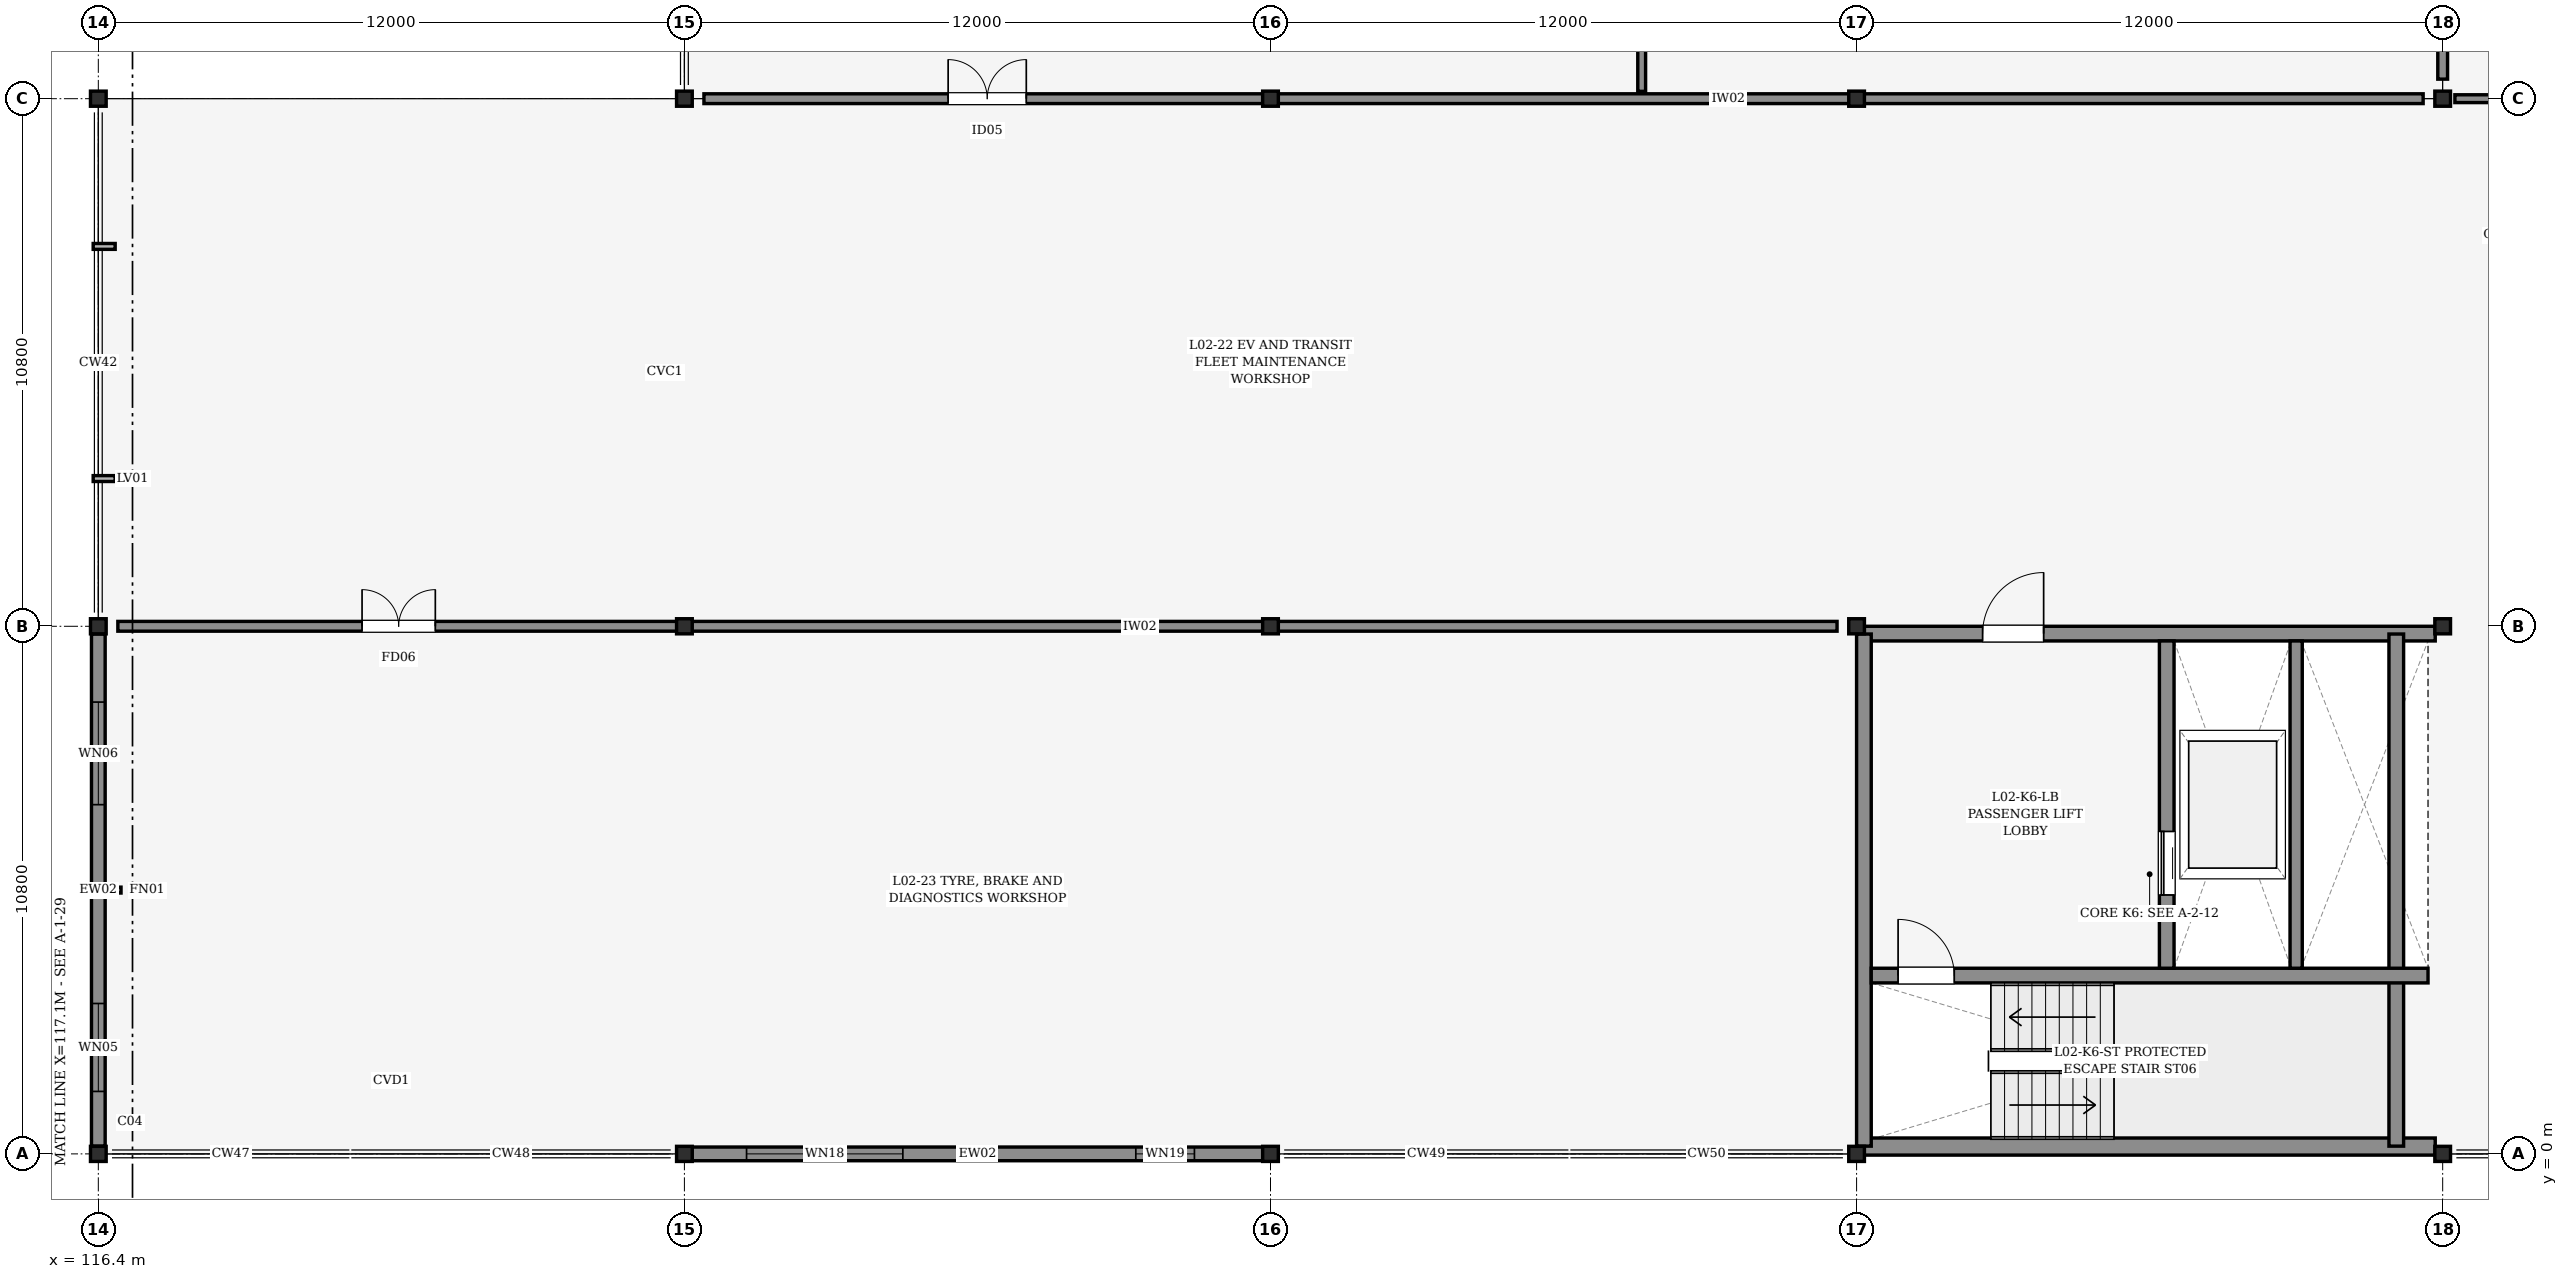
"""IFC4 building model, lengths in metres.
Left out: names, types, materials, properties, quantities, classifications, styles, units other than length and angle.
Written with IfcOpenShell. Run it as: python <this file> out.ifc"""

import sys

from ifc_helpers import new_model, si_unit, direction, frame, frame_2d, origin, origin_2d, place, context, subcontext, project, spatial, rectangle, i_section, extrude, element, fill, save


model = new_model("IFC4")
c1 = context("Model", 3, precision=1e-05, world=origin(), true_north=direction((0.0, 1.0)))
c2 = subcontext(c1, "Body", "Model", "MODEL_VIEW")
j1 = project(units=[si_unit("LENGTHUNIT", "METRE"), si_unit("PLANEANGLEUNIT", "RADIAN")], contexts=[c1])
p1 = place(None, origin())
s1 = spatial("IfcSite", under=j1, at=p1, CompositionType="ELEMENT")
p2 = place(p1, origin())
s2 = spatial("IfcBuilding", under=s1, at=p2, CompositionType="ELEMENT")
p3 = place(p2, frame((0.0, 0.0, 9.0)))
s3 = spatial("IfcBuildingStorey", under=s2, at=p3, CompositionType="ELEMENT", Elevation=9.0)
for number, where, z_axis, x_axis in (
    (1, (116.4, 0.0, 0.0), (0.0, 0.0, 1.0), (1.0, 0.0, 0.0)),
    (2, (116.4, 10.8, 0.0), (0.0, 0.0, 1.0), (1.0, 0.0, 0.0)),
    (3, (116.4, 21.6, 0.0), (0.0, 0.0, 1.0), (1.0, 0.0, 0.0)),
    (4, (128.4, 0.0, 0.0), (0.0, 0.0, 1.0), (1.0, 0.0, 0.0)),
    (5, (128.4, 10.8, 0.0), (0.0, 0.0, 1.0), (1.0, 0.0, 0.0)),
    (6, (128.4, 21.6, 0.0), (0.0, 0.0, 1.0), (1.0, 0.0, 0.0)),
    (7, (140.4, 0.0, 0.0), (0.0, 0.0, 1.0), (1.0, 0.0, 0.0)),
    (8, (140.4, 10.8, 0.0), (0.0, 0.0, 1.0), (1.0, 0.0, 0.0)),
    (9, (140.4, 21.6, 0.0), (0.0, 0.0, 1.0), (1.0, 0.0, 0.0)),
    (10, (152.4, 0.0, 0.0), (0.0, 0.0, 1.0), (1.0, 0.0, 0.0)),
    (11, (152.4, 10.8, 0.0), (0.0, 0.0, 1.0), (1.0, 0.0, 0.0)),
    (12, (152.4, 21.6, 0.0), (0.0, 0.0, 1.0), (1.0, 0.0, 0.0)),
    (13, (164.4, 0.0, 0.0), (0.0, 0.0, 1.0), (1.0, 0.0, 0.0)),
    (14, (164.4, 10.8, 0.0), (0.0, 0.0, 1.0), (1.0, 0.0, 0.0)),
    (15, (164.4, 21.6, 0.0), (0.0, 0.0, 1.0), (1.0, 0.0, 0.0)),
):
    element("IfcColumn", number, at=place(p3, frame(where, z_axis=z_axis, x_axis=x_axis)), inside=s3, PredefinedType="COLUMN", context=c2, shape_type="SweptSolid", body=[
        extrude(i_section(OverallWidth=0.309, OverallDepth=0.321, WebThickness=0.014, FlangeThickness=0.022, FilletRadius=0.015, at=origin_2d()), origin(), (0.0, 0.0, 1.0), 3.6),
    ])
p4 = place(p3, frame((128.552, 0.0, 0.0), z_axis=(0.0, 0.0, 1.0), x_axis=(1.0, 0.0, 0.0)))
e16 = element("IfcWall", 16, at=p4, inside=s3, PredefinedType="STANDARD", context=c2, shape_type="SweptSolid", body=[
    extrude(rectangle(XDim=11.695, YDim=0.28, at=frame_2d((5.848, 0.0))), origin(), (0.0, 0.0, 1.0), 2.535),
])
p5 = place(p4, frame((1.12, 0.0, 0.595)))
e17 = element("IfcOpeningElement", 17, at=p5, cuts=e16, PredefinedType="OPENING", context=c2, shape_type="SweptSolid", body=[
    extrude(rectangle(XDim=3.2, YDim=1.8, at=frame_2d((1.6, 0.9))), frame((0.0, 0.15, 0.0), z_axis=(0.0, -1.0, 0.0), x_axis=(1.0, 0.0, 0.0)), (0.0, 0.0, 1.0), 0.3),
])
p6 = place(p4, frame((9.09, 0.0, 0.595)))
e18 = element("IfcOpeningElement", 18, at=p6, cuts=e16, PredefinedType="OPENING", context=c2, shape_type="SweptSolid", body=[
    extrude(rectangle(XDim=1.2, YDim=1.8, at=frame_2d((0.6, 0.9))), frame((0.0, 0.15, 0.0), z_axis=(0.0, -1.0, 0.0), x_axis=(1.0, 0.0, 0.0)), (0.0, 0.0, 1.0), 0.3),
])
p7 = place(p3, frame((116.4, 0.158, 0.0), z_axis=(0.0, 0.0, 1.0), x_axis=(0.0, 1.0, 0.0)))
e19 = element("IfcWall", 19, at=p7, inside=s3, PredefinedType="STANDARD", context=c2, shape_type="SweptSolid", body=[
    extrude(rectangle(XDim=10.483, YDim=0.28, at=frame_2d((5.242, 0.0))), origin(), (0.0, 0.0, 1.0), 2.535),
])
p8 = place(p7, frame((1.12, 0.0, 0.595)))
e20 = element("IfcOpeningElement", 20, at=p8, cuts=e19, PredefinedType="OPENING", context=c2, shape_type="SweptSolid", body=[
    extrude(rectangle(XDim=1.8, YDim=1.8, at=frame_2d((0.9, 0.9))), frame((0.0, 0.15, 0.0), z_axis=(0.0, -1.0, 0.0), x_axis=(1.0, 0.0, 0.0)), (0.0, 0.0, 1.0), 0.3),
])
p9 = place(p7, frame((6.99, 0.0, 0.595)))
e21 = element("IfcOpeningElement", 21, at=p9, cuts=e19, PredefinedType="OPENING", context=c2, shape_type="SweptSolid", body=[
    extrude(rectangle(XDim=2.1, YDim=1.8, at=frame_2d((1.05, 0.9))), frame((0.0, 0.15, 0.0), z_axis=(0.0, -1.0, 0.0), x_axis=(1.0, 0.0, 0.0)), (0.0, 0.0, 1.0), 0.3),
])
p10 = place(p3, frame((152.552, 0.15, 0.0), z_axis=(0.0, 0.0, 1.0), x_axis=(1.0, 0.0, 0.0)))
e22 = element("IfcWall", 22, at=p10, inside=s3, PredefinedType="SHEAR", context=c2, shape_type="SweptSolid", body=[
    extrude(rectangle(XDim=11.695, YDim=0.35, at=frame_2d((5.848, 0.0))), origin(), (0.0, 0.0, 1.0), 3.38),
])
p11 = place(p3, frame((152.552, 10.65, 0.0), z_axis=(0.0, 0.0, 1.0), x_axis=(1.0, 0.0, 0.0)))
e23 = element("IfcWall", 23, at=p11, inside=s3, PredefinedType="SHEAR", context=c2, shape_type="SweptSolid", body=[
    extrude(rectangle(XDim=11.695, YDim=0.3, at=frame_2d((5.848, 0.0))), origin(), (0.0, 0.0, 1.0), 3.38),
])
p12 = place(p11, frame((2.427, 0.0, 0.0)))
e24 = element("IfcOpeningElement", 24, at=p12, cuts=e23, PredefinedType="OPENING", context=c2, shape_type="SweptSolid", body=[
    extrude(rectangle(XDim=1.25, YDim=2.15, at=frame_2d((0.625, 1.075))), frame((0.0, 0.16, 0.0), z_axis=(0.0, -1.0, 0.0), x_axis=(1.0, 0.0, 0.0)), (0.0, 0.0, 1.0), 0.32),
])
for number, where, z_axis, x_axis in (
    (25, (152.55, 0.158, 0.0), (0.0, 0.0, 1.0), (0.0, 1.0, 0.0)),
    (26, (163.45, 0.158, 0.0), (0.0, 0.0, 1.0), (0.0, 1.0, 0.0)),
):
    element("IfcWall", number, at=place(p3, frame(where, z_axis=z_axis, x_axis=x_axis)), inside=s3, PredefinedType="SHEAR", context=c2, shape_type="SweptSolid", body=[
        extrude(rectangle(XDim=10.483, YDim=0.3, at=frame_2d((5.242, 0.0))), origin(), (0.0, 0.0, 1.0), 3.38),
    ])
p13 = place(p3, frame((152.7, 3.65, 0.0), z_axis=(0.0, 0.0, 1.0), x_axis=(1.0, 0.0, 0.0)))
e27 = element("IfcWall", 27, at=p13, inside=s3, PredefinedType="SHEAR", context=c2, shape_type="SweptSolid", body=[
    extrude(rectangle(XDim=11.4, YDim=0.3, at=frame_2d((5.7, 0.0))), origin(), (0.0, 0.0, 1.0), 3.38),
])
p14 = place(p13, frame((0.55, 0.0, 0.0)))
e28 = element("IfcOpeningElement", 28, at=p14, cuts=e27, PredefinedType="OPENING", context=c2, shape_type="SweptSolid", body=[
    extrude(rectangle(XDim=1.15, YDim=2.15, at=frame_2d((0.575, 1.075))), frame((0.0, 0.16, 0.0), z_axis=(0.0, -1.0, 0.0), x_axis=(1.0, 0.0, 0.0)), (0.0, 0.0, 1.0), 0.32),
])
p15 = place(p3, frame((158.75, 3.8, 0.0), z_axis=(0.0, 0.0, 1.0), x_axis=(0.0, 1.0, 0.0)))
e29 = element("IfcWall", 29, at=p15, inside=s3, PredefinedType="SHEAR", context=c2, shape_type="SweptSolid", body=[
    extrude(rectangle(XDim=6.7, YDim=0.3, at=frame_2d((3.35, 0.0))), origin(), (0.0, 0.0, 1.0), 3.38),
])
p16 = place(p15, frame((1.5, 0.0, 0.0)))
e30 = element("IfcOpeningElement", 30, at=p16, cuts=e29, PredefinedType="OPENING", context=c2, shape_type="SweptSolid", body=[
    extrude(rectangle(XDim=1.3, YDim=2.3, at=frame_2d((0.65, 1.15))), frame((0.0, 0.16, 0.0), z_axis=(0.0, -1.0, 0.0), x_axis=(1.0, 0.0, 0.0)), (0.0, 0.0, 1.0), 0.32),
])
p17 = place(p3, frame((161.4, 3.8, 0.0), z_axis=(0.0, 0.0, 1.0), x_axis=(0.0, 1.0, 0.0)))
e31 = element("IfcWall", 31, at=p17, inside=s3, PredefinedType="PARTITIONING", context=c2, shape_type="SweptSolid", body=[
    extrude(rectangle(XDim=6.7, YDim=0.25, at=frame_2d((3.35, 0.0))), origin(), (0.0, 0.0, 1.0), 2.525),
])
p18 = place(p3, frame((164.65, 21.6, 0.0), z_axis=(0.0, 0.0, 1.0), x_axis=(1.0, 0.0, 0.0)))
e32 = element("IfcWall", 32, at=p18, inside=s3, PredefinedType="PARTITIONING", context=c2, shape_type="SweptSolid", body=[
    extrude(rectangle(XDim=11.5, YDim=0.16, at=frame_2d((5.75, 0.0))), origin(), (0.0, 0.0, 1.0), 2.525),
])
p19 = place(p3, frame((116.8, 10.8, 0.0), z_axis=(0.0, 0.0, 1.0), x_axis=(1.0, 0.0, 0.0)))
e33 = element("IfcWall", 33, at=p19, inside=s3, PredefinedType="PARTITIONING", context=c2, shape_type="SweptSolid", body=[
    extrude(rectangle(XDim=35.2, YDim=0.2, at=frame_2d((17.6, 0.0))), origin(), (0.0, 0.0, 1.0), 2.525),
])
p20 = place(p19, frame((5.0, 0.0, 0.0)))
e34 = element("IfcOpeningElement", 34, at=p20, cuts=e33, PredefinedType="OPENING", context=c2, shape_type="SweptSolid", body=[
    extrude(rectangle(XDim=1.5, YDim=2.25, at=frame_2d((0.75, 1.125))), frame((0.0, 0.11, 0.0), z_axis=(0.0, -1.0, 0.0), x_axis=(1.0, 0.0, 0.0)), (0.0, 0.0, 1.0), 0.22),
])
p21 = place(p3, frame((128.8, 21.6, 0.0), z_axis=(0.0, 0.0, 1.0), x_axis=(1.0, 0.0, 0.0)))
e35 = element("IfcWall", 35, at=p21, inside=s3, PredefinedType="PARTITIONING", context=c2, shape_type="SweptSolid", body=[
    extrude(rectangle(XDim=35.2, YDim=0.2, at=frame_2d((17.6, 0.0))), origin(), (0.0, 0.0, 1.0), 2.525),
])
p22 = place(p21, frame((5.0, 0.0, 0.0)))
e36 = element("IfcOpeningElement", 36, at=p22, cuts=e35, PredefinedType="OPENING", context=c2, shape_type="SweptSolid", body=[
    extrude(rectangle(XDim=1.6, YDim=2.25, at=frame_2d((0.8, 1.125))), frame((0.0, 0.11, 0.0), z_axis=(0.0, -1.0, 0.0), x_axis=(1.0, 0.0, 0.0)), (0.0, 0.0, 1.0), 0.22),
])
p23 = place(p3, frame((148.0, 21.75, 0.0), z_axis=(0.0, 0.0, 1.0), x_axis=(0.0, 1.0, 0.0)))
e37 = element("IfcWall", 37, at=p23, inside=s3, PredefinedType="PARTITIONING", context=c2, shape_type="SweptSolid", body=[
    extrude(rectangle(XDim=24.9, YDim=0.16, at=frame_2d((12.45, 0.0))), origin(), (0.0, 0.0, 1.0), 2.525),
])
p24 = place(p23, frame((6.0, 0.0, 0.0)))
e38 = element("IfcOpeningElement", 38, at=p24, cuts=e37, PredefinedType="OPENING", context=c2, shape_type="SweptSolid", body=[
    extrude(rectangle(XDim=0.95, YDim=2.1, at=frame_2d((0.475, 1.05))), frame((0.0, 0.09, 0.0), z_axis=(0.0, -1.0, 0.0), x_axis=(1.0, 0.0, 0.0)), (0.0, 0.0, 1.0), 0.18),
])
p25 = place(p3, frame((164.4, 22.0, 0.0), z_axis=(0.0, 0.0, 1.0), x_axis=(0.0, 1.0, 0.0)))
e39 = element("IfcWall", 39, at=p25, inside=s3, PredefinedType="PARTITIONING", context=c2, shape_type="SweptSolid", body=[
    extrude(rectangle(XDim=24.4, YDim=0.2, at=frame_2d((12.2, 0.0))), origin(), (0.0, 0.0, 1.0), 2.525),
])
p26 = place(p25, frame((6.0, 0.0, 0.0)))
e40 = element("IfcOpeningElement", 40, at=p26, cuts=e39, PredefinedType="OPENING", context=c2, shape_type="SweptSolid", body=[
    extrude(rectangle(XDim=1.6, YDim=2.25, at=frame_2d((0.8, 1.125))), frame((0.0, 0.11, 0.0), z_axis=(0.0, -1.0, 0.0), x_axis=(1.0, 0.0, 0.0)), (0.0, 0.0, 1.0), 0.22),
])
p27 = place(p5, origin())
e41 = element("IfcWindow", 41, at=p27, inside=s3, PartitioningType="SINGLE_PANEL", PredefinedType="WINDOW", context=c2, shape_type="SweptSolid", body=[
    extrude(rectangle(XDim=3.2, YDim=1.8, at=frame_2d((1.6, 0.9))), frame((0.0, 0.03, 0.0), z_axis=(0.0, -1.0, 0.0), x_axis=(1.0, 0.0, 0.0)), (0.0, 0.0, 1.0), 0.06),
])
fill(e17, e41)
p28 = place(p6, origin())
e42 = element("IfcWindow", 42, at=p28, inside=s3, PartitioningType="SINGLE_PANEL", PredefinedType="WINDOW", context=c2, shape_type="SweptSolid", body=[
    extrude(rectangle(XDim=1.2, YDim=1.8, at=frame_2d((0.6, 0.9))), frame((0.0, 0.03, 0.0), z_axis=(0.0, -1.0, 0.0), x_axis=(1.0, 0.0, 0.0)), (0.0, 0.0, 1.0), 0.06),
])
fill(e18, e42)
p29 = place(p8, origin())
e43 = element("IfcWindow", 43, at=p29, inside=s3, PartitioningType="SINGLE_PANEL", PredefinedType="WINDOW", context=c2, shape_type="SweptSolid", body=[
    extrude(rectangle(XDim=1.8, YDim=1.8, at=frame_2d((0.9, 0.9))), frame((0.0, 0.03, 0.0), z_axis=(0.0, -1.0, 0.0), x_axis=(1.0, 0.0, 0.0)), (0.0, 0.0, 1.0), 0.06),
])
fill(e20, e43)
p30 = place(p9, origin())
e44 = element("IfcWindow", 44, at=p30, inside=s3, PartitioningType="SINGLE_PANEL", PredefinedType="WINDOW", context=c2, shape_type="SweptSolid", body=[
    extrude(rectangle(XDim=2.1, YDim=1.8, at=frame_2d((1.05, 0.9))), frame((0.0, 0.03, 0.0), z_axis=(0.0, -1.0, 0.0), x_axis=(1.0, 0.0, 0.0)), (0.0, 0.0, 1.0), 0.06),
])
fill(e21, e44)
p31 = place(p12, origin())
e45 = element("IfcDoor", 45, at=p31, inside=s3, OperationType="SINGLE_SWING_RIGHT", PredefinedType="DOOR", context=c2, shape_type="SweptSolid", body=[
    extrude(rectangle(XDim=1.25, YDim=2.15, at=frame_2d((0.625, 1.075))), frame((0.0, 0.025, 0.0), z_axis=(0.0, -1.0, 0.0), x_axis=(1.0, 0.0, 0.0)), (0.0, 0.0, 1.0), 0.05),
])
fill(e24, e45)
p32 = place(p14, origin())
e46 = element("IfcDoor", 46, at=p32, inside=s3, OperationType="SINGLE_SWING_LEFT", PredefinedType="DOOR", context=c2, shape_type="SweptSolid", body=[
    extrude(rectangle(XDim=1.15, YDim=2.15, at=frame_2d((0.575, 1.075))), frame((0.0, 0.025, 0.0), z_axis=(0.0, -1.0, 0.0), x_axis=(1.0, 0.0, 0.0)), (0.0, 0.0, 1.0), 0.05),
])
fill(e28, e46)
p33 = place(p16, origin())
e47 = element("IfcDoor", 47, at=p33, inside=s3, OperationType="SLIDING_TO_LEFT", PredefinedType="DOOR", context=c2, shape_type="SweptSolid", body=[
    extrude(rectangle(XDim=1.3, YDim=2.3, at=frame_2d((0.65, 1.15))), frame((0.0, 0.025, 0.0), z_axis=(0.0, -1.0, 0.0), x_axis=(1.0, 0.0, 0.0)), (0.0, 0.0, 1.0), 0.05),
])
fill(e30, e47)
p34 = place(p20, origin())
e48 = element("IfcDoor", 48, at=p34, inside=s3, OperationType="DOUBLE_DOOR_SINGLE_SWING", PredefinedType="DOOR", context=c2, shape_type="SweptSolid", body=[
    extrude(rectangle(XDim=1.5, YDim=2.25, at=frame_2d((0.75, 1.125))), frame((0.0, 0.025, 0.0), z_axis=(0.0, -1.0, 0.0), x_axis=(1.0, 0.0, 0.0)), (0.0, 0.0, 1.0), 0.05),
])
fill(e34, e48)
p35 = place(p22, origin())
e49 = element("IfcDoor", 49, at=p35, inside=s3, OperationType="DOUBLE_DOOR_SINGLE_SWING", PredefinedType="DOOR", context=c2, shape_type="SweptSolid", body=[
    extrude(rectangle(XDim=1.6, YDim=2.25, at=frame_2d((0.8, 1.125))), frame((0.0, 0.025, 0.0), z_axis=(0.0, -1.0, 0.0), x_axis=(1.0, 0.0, 0.0)), (0.0, 0.0, 1.0), 0.05),
])
fill(e36, e49)
save(model, sys.argv[1])
